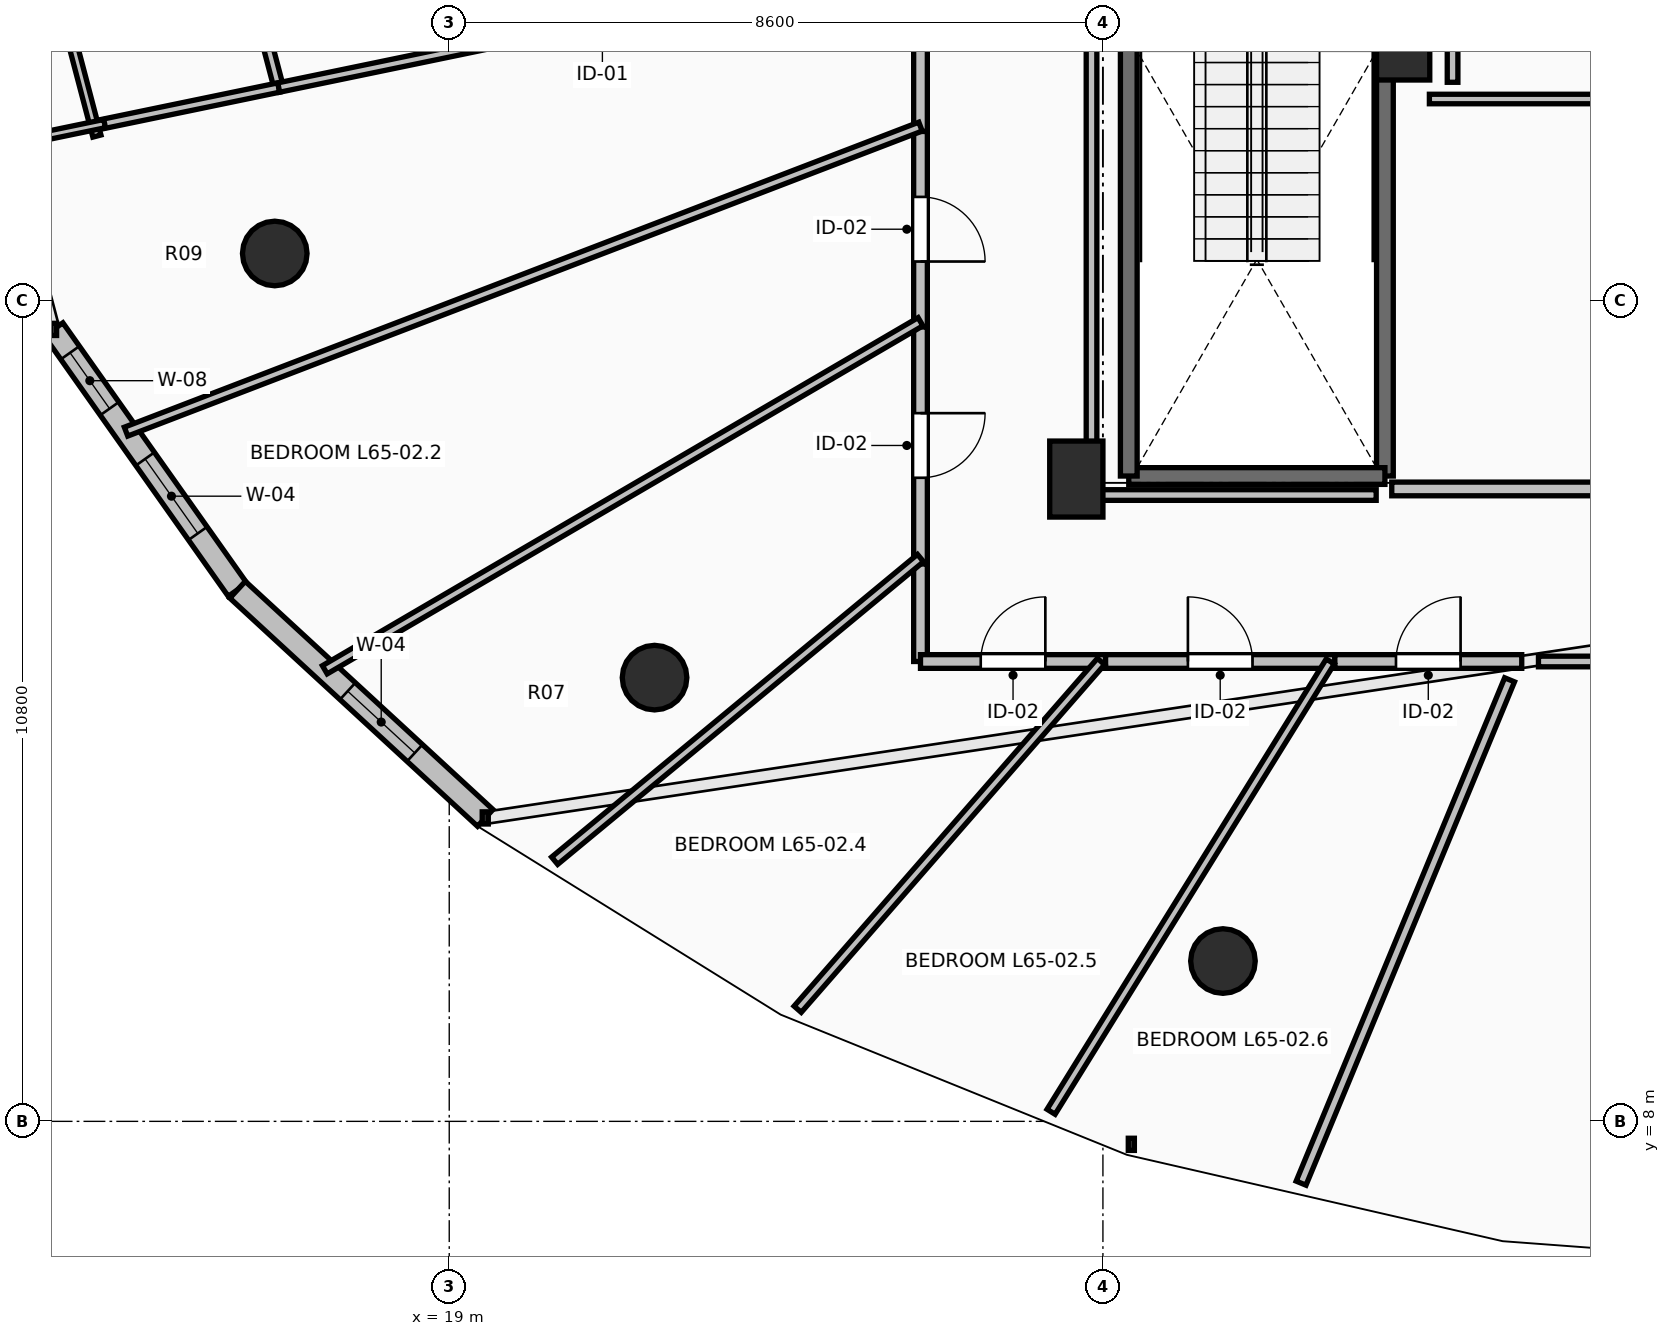
"""IFC4 building model, lengths in metres.
Left out: names, types, materials, properties, quantities, classifications, styles, units other than length and angle.
Written with IfcOpenShell. Run it as: python <this file> out.ifc"""

import sys

from ifc_helpers import new_model, si_unit, direction, frame, frame_2d, origin, origin_2d, place, context, subcontext, project, spatial, rectangle, circle, extrude, element, fill, save


model = new_model("IFC4")
c1 = context("Model", 3, precision=1e-05, world=origin(), true_north=direction((0.0, 1.0)))
c2 = subcontext(c1, "Body", "Model", "MODEL_VIEW")
j1 = project(units=[si_unit("LENGTHUNIT", "METRE"), si_unit("PLANEANGLEUNIT", "RADIAN")], contexts=[c1])
p1 = place(None, origin())
s1 = spatial("IfcSite", under=j1, at=p1, CompositionType="ELEMENT")
p2 = place(p1, origin())
s2 = spatial("IfcBuilding", under=s1, at=p2, CompositionType="ELEMENT")
p3 = place(p2, frame((0.0, 0.0, 241.35)))
s3 = spatial("IfcBuildingStorey", under=s2, at=p3, CompositionType="ELEMENT", Elevation=241.35)
for number, where, z_axis, x_axis in (
    (1, (16.705, 19.418, 0.0), (0.0, 0.0, 1.0), (-0.924, -0.383, 0.0)),
    (2, (21.701, 13.838, 0.0), (0.0, 0.0, 1.0), (-0.707, -0.707, 0.0)),
    (3, (29.179, 10.109, 0.0), (0.0, 0.0, 1.0), (-0.383, -0.924, 0.0)),
):
    element("IfcColumn", number, at=place(p3, frame(where, z_axis=z_axis, x_axis=x_axis)), inside=s3, PredefinedType="COLUMN", context=c2, shape_type="SweptSolid", body=[
        extrude(circle(Radius=0.425, at=origin_2d()), origin(), (0.0, 0.0, 1.0), 3.55),
    ])
for number, where, z_axis, x_axis in (
    (4, (27.25, 16.45, 0.0), (0.0, 0.0, 1.0), (1.0, 0.0, 0.0)),
    (5, (31.55, 22.2, 0.0), (0.0, 0.0, 1.0), (1.0, 0.0, 0.0)),
):
    element("IfcColumn", number, at=place(p3, frame(where, z_axis=z_axis, x_axis=x_axis)), inside=s3, PredefinedType="PILASTER", context=c2, shape_type="SweptSolid", body=[
        extrude(rectangle(XDim=0.7, YDim=1.0, at=origin_2d()), origin(), (0.0, 0.0, 1.0), 3.55),
    ])
p4 = place(p3, frame((13.794, 18.419, 0.0), z_axis=(0.0, 0.0, 1.0), x_axis=(0.577261247247, -0.816559521668, 0.0)))
e6 = element("IfcWall", 6, at=p4, inside=s3, PredefinedType="STANDARD", context=c2, shape_type="SweptSolid", body=[
    extrude(rectangle(XDim=4.194, YDim=0.3, at=frame_2d((2.097, 0.0))), origin(), (0.0, 0.0, 1.0), 3.29),
])
p5 = place(p4, frame((0.376, 0.0, 0.85)))
e7 = element("IfcOpeningElement", 7, at=p5, cuts=e6, PredefinedType="OPENING", context=c2, shape_type="SweptSolid", body=[
    extrude(rectangle(XDim=0.9, YDim=1.8, at=frame_2d((0.45, 0.9))), frame((0.0, 0.165, 0.0), z_axis=(0.0, -1.0, 0.0), x_axis=(1.0, 0.0, 0.0)), (0.0, 0.0, 1.0), 0.33),
])
p6 = place(p4, frame((2.087, 0.0, 0.85)))
e8 = element("IfcOpeningElement", 8, at=p6, cuts=e6, PredefinedType="OPENING", context=c2, shape_type="SweptSolid", body=[
    extrude(rectangle(XDim=1.2, YDim=1.95, at=frame_2d((0.6, 0.975))), frame((0.0, 0.165, 0.0), z_axis=(0.0, -1.0, 0.0), x_axis=(1.0, 0.0, 0.0)), (0.0, 0.0, 1.0), 0.33),
])
p7 = place(p3, frame((16.216, 14.994, 0.0), z_axis=(0.0, 0.0, 1.0), x_axis=(0.735445373611, -0.677584018727, 0.0)))
e9 = element("IfcWall", 9, at=p7, inside=s3, PredefinedType="STANDARD", context=c2, shape_type="SweptSolid", body=[
    extrude(rectangle(XDim=4.43, YDim=0.3, at=frame_2d((2.215, 0.0))), origin(), (0.0, 0.0, 1.0), 3.29),
])
p8 = place(p7, frame((1.969, 0.0, 0.85)))
e10 = element("IfcOpeningElement", 10, at=p8, cuts=e9, PredefinedType="OPENING", context=c2, shape_type="SweptSolid", body=[
    extrude(rectangle(XDim=1.2, YDim=1.95, at=frame_2d((0.6, 0.975))), frame((0.0, 0.165, 0.0), z_axis=(0.0, -1.0, 0.0), x_axis=(1.0, 0.0, 0.0)), (0.0, 0.0, 1.0), 0.33),
])
p9 = place(p3, frame((31.31, 23.91, 0.0), z_axis=(0.0, 0.0, 1.0), x_axis=(0.0, -1.0, 0.0)))
e11 = element("IfcWall", 11, at=p9, inside=s3, PredefinedType="SOLIDWALL", context=c2, shape_type="SweptSolid", body=[
    extrude(rectangle(XDim=7.42, YDim=0.22, at=frame_2d((3.71, 0.0))), origin(), (0.0, 0.0, 1.0), 3.29),
])
p10 = place(p3, frame((31.31, 16.49, 0.0), z_axis=(0.0, 0.0, 1.0), x_axis=(-1.0, 0.0, 0.0)))
e12 = element("IfcWall", 12, at=p10, inside=s3, PredefinedType="SOLIDWALL", context=c2, shape_type="SweptSolid", body=[
    extrude(rectangle(XDim=3.37, YDim=0.22, at=frame_2d((1.685, 0.0))), origin(), (0.0, 0.0, 1.0), 3.29),
])
p11 = place(p3, frame((27.94, 16.49, 0.0), z_axis=(0.0, 0.0, 1.0), x_axis=(0.0, 1.0, 0.0)))
e13 = element("IfcWall", 13, at=p11, inside=s3, PredefinedType="SOLIDWALL", context=c2, shape_type="SweptSolid", body=[
    extrude(rectangle(XDim=7.42, YDim=0.22, at=frame_2d((3.71, 0.0))), origin(), (0.0, 0.0, 1.0), 3.29),
])
p12 = place(p3, frame((35.005, 21.45, 0.0), z_axis=(0.0, 0.0, 1.0), x_axis=(-1.0, 0.0, 0.0)))
e14 = element("IfcWall", 14, at=p12, inside=s3, PredefinedType="PARTITIONING", context=c2, shape_type="SweptSolid", body=[
    extrude(rectangle(XDim=3.11, YDim=0.125, at=frame_2d((1.555, 0.0))), origin(), (0.0, 0.0, 1.0), 3.29),
])
p13 = place(p3, frame((31.4, 16.32, 0.0), z_axis=(0.0, 0.0, 1.0), x_axis=(1.0, 0.0, 0.0)))
e15 = element("IfcWall", 15, at=p13, inside=s3, PredefinedType="PARTITIONING", context=c2, shape_type="SweptSolid", body=[
    extrude(rectangle(XDim=7.4, YDim=0.18, at=frame_2d((3.7, 0.0))), origin(), (0.0, 0.0, 1.0), 3.29),
])
p14 = place(p13, frame((3.275, 0.0, 0.0)))
e16 = element("IfcOpeningElement", 16, at=p14, cuts=e15, PredefinedType="OPENING", context=c2, shape_type="SweptSolid", body=[
    extrude(rectangle(XDim=0.85, YDim=2.1, at=frame_2d((0.425, 1.05))), frame((0.0, 0.105, 0.0), z_axis=(0.0, -1.0, 0.0), x_axis=(1.0, 0.0, 0.0)), (0.0, 0.0, 1.0), 0.21),
])
p15 = place(p3, frame((25.2, 23.288, 0.0), z_axis=(0.0, 0.0, 1.0), x_axis=(0.0, -1.0, 0.0)))
e17 = element("IfcWall", 17, at=p15, inside=s3, PredefinedType="PARTITIONING", context=c2, shape_type="SweptSolid", body=[
    extrude(rectangle(XDim=2.265, YDim=0.18, at=frame_2d((1.133, 0.0))), origin(), (0.0, 0.0, 1.0), 3.29),
])
p16 = place(p3, frame((25.2, 21.023, 0.0), z_axis=(0.0, 0.0, 1.0), x_axis=(0.0, -1.0, 0.0)))
e18 = element("IfcWall", 18, at=p16, inside=s3, PredefinedType="PARTITIONING", context=c2, shape_type="SweptSolid", body=[
    extrude(rectangle(XDim=2.572, YDim=0.18, at=frame_2d((1.286, 0.0))), origin(), (0.0, 0.0, 1.0), 3.29),
])
p17 = place(p16, frame((0.861, 0.0, 0.0)))
e19 = element("IfcOpeningElement", 19, at=p17, cuts=e18, PredefinedType="OPENING", context=c2, shape_type="SweptSolid", body=[
    extrude(rectangle(XDim=0.85, YDim=2.1, at=frame_2d((0.425, 1.05))), frame((0.0, 0.105, 0.0), z_axis=(0.0, -1.0, 0.0), x_axis=(1.0, 0.0, 0.0)), (0.0, 0.0, 1.0), 0.21),
])
p18 = place(p3, frame((25.2, 18.451, 0.0), z_axis=(0.0, 0.0, 1.0), x_axis=(0.0, -1.0, 0.0)))
e20 = element("IfcWall", 20, at=p18, inside=s3, PredefinedType="PARTITIONING", context=c2, shape_type="SweptSolid", body=[
    extrude(rectangle(XDim=3.118, YDim=0.18, at=frame_2d((1.559, 0.0))), origin(), (0.0, 0.0, 1.0), 2.482),
])
p19 = place(p18, frame((1.134, 0.0, 0.0)))
e21 = element("IfcOpeningElement", 21, at=p19, cuts=e20, PredefinedType="OPENING", context=c2, shape_type="SweptSolid", body=[
    extrude(rectangle(XDim=0.85, YDim=2.1, at=frame_2d((0.425, 1.05))), frame((0.0, 0.105, 0.0), z_axis=(0.0, -1.0, 0.0), x_axis=(1.0, 0.0, 0.0)), (0.0, 0.0, 1.0), 0.21),
])
p20 = place(p3, frame((25.2, 15.333, 0.0), z_axis=(0.0, 0.0, 1.0), x_axis=(0.0, -1.0, 0.0)))
e22 = element("IfcWall", 22, at=p20, inside=s3, PredefinedType="PARTITIONING", context=c2, shape_type="SweptSolid", body=[
    extrude(rectangle(XDim=1.283, YDim=0.18, at=frame_2d((0.642, 0.0))), origin(), (0.0, 0.0, 1.0), 2.482),
])
p21 = place(p3, frame((25.2, 14.05, 0.0), z_axis=(0.0, 0.0, 1.0), x_axis=(1.0, 0.0, 0.0)))
e23 = element("IfcWall", 23, at=p21, inside=s3, PredefinedType="PARTITIONING", context=c2, shape_type="SweptSolid", body=[
    extrude(rectangle(XDim=2.435, YDim=0.18, at=frame_2d((1.218, 0.0))), origin(), (0.0, 0.0, 1.0), 2.924),
])
p22 = place(p21, frame((0.792, 0.0, 0.0)))
e24 = element("IfcOpeningElement", 24, at=p22, cuts=e23, PredefinedType="OPENING", context=c2, shape_type="SweptSolid", body=[
    extrude(rectangle(XDim=0.85, YDim=2.1, at=frame_2d((0.425, 1.05))), frame((0.0, 0.105, 0.0), z_axis=(0.0, -1.0, 0.0), x_axis=(1.0, 0.0, 0.0)), (0.0, 0.0, 1.0), 0.21),
])
p23 = place(p3, frame((27.635, 14.05, 0.0), z_axis=(0.0, 0.0, 1.0), x_axis=(1.0, 0.0, 0.0)))
e25 = element("IfcWall", 25, at=p23, inside=s3, PredefinedType="PARTITIONING", context=c2, shape_type="SweptSolid", body=[
    extrude(rectangle(XDim=3.016, YDim=0.18, at=frame_2d((1.508, 0.0))), origin(), (0.0, 0.0, 1.0), 2.482),
])
p24 = place(p23, frame((1.083, 0.0, 0.0)))
e26 = element("IfcOpeningElement", 26, at=p24, cuts=e25, PredefinedType="OPENING", context=c2, shape_type="SweptSolid", body=[
    extrude(rectangle(XDim=0.85, YDim=2.1, at=frame_2d((0.425, 1.05))), frame((0.0, 0.105, 0.0), z_axis=(0.0, -1.0, 0.0), x_axis=(1.0, 0.0, 0.0)), (0.0, 0.0, 1.0), 0.21),
])
p25 = place(p3, frame((30.651, 14.05, 0.0), z_axis=(0.0, 0.0, 1.0), x_axis=(1.0, 0.0, 0.0)))
e27 = element("IfcWall", 27, at=p25, inside=s3, PredefinedType="PARTITIONING", context=c2, shape_type="SweptSolid", body=[
    extrude(rectangle(XDim=2.459, YDim=0.18, at=frame_2d((1.229, 0.0))), origin(), (0.0, 0.0, 1.0), 2.972),
])
p26 = place(p25, frame((0.804, 0.0, 0.0)))
e28 = element("IfcOpeningElement", 28, at=p26, cuts=e27, PredefinedType="OPENING", context=c2, shape_type="SweptSolid", body=[
    extrude(rectangle(XDim=0.85, YDim=2.1, at=frame_2d((0.425, 1.05))), frame((0.0, 0.105, 0.0), z_axis=(0.0, -1.0, 0.0), x_axis=(1.0, 0.0, 0.0)), (0.0, 0.0, 1.0), 0.21),
])
p27 = place(p3, frame((15.6, 26.0, 0.0), z_axis=(0.0, 0.0, 1.0), x_axis=(0.25436383836, -0.967108596661, 0.0)))
e29 = element("IfcWall", 29, at=p27, inside=s3, PredefinedType="PARTITIONING", context=c2, shape_type="SweptSolid", body=[
    extrude(rectangle(XDim=4.549, YDim=0.125, at=frame_2d((2.274, 0.0))), origin(), (0.0, 0.0, 1.0), 2.482),
])
p28 = place(p27, frame((1.824, 0.0, 0.0)))
e30 = element("IfcOpeningElement", 30, at=p28, cuts=e29, PredefinedType="OPENING", context=c2, shape_type="SweptSolid", body=[
    extrude(rectangle(XDim=0.9, YDim=2.1, at=frame_2d((0.45, 1.05))), frame((0.0, 0.077, 0.0), z_axis=(0.0, -1.0, 0.0), x_axis=(1.0, 0.0, 0.0)), (0.0, 0.0, 1.0), 0.155),
])
p29 = place(p3, frame((16.757, 21.601, 0.0), z_axis=(0.0, 0.0, 1.0), x_axis=(-0.979193678003, -0.2029279206, 0.0)))
e31 = element("IfcWall", 31, at=p29, inside=s3, PredefinedType="PARTITIONING", context=c2, shape_type="SweptSolid", body=[
    extrude(rectangle(XDim=2.479, YDim=0.125, at=frame_2d((1.24, 0.0))), origin(), (0.0, 0.0, 1.0), 2.874),
])
p30 = place(p3, frame((16.757, 21.601, 0.0), z_axis=(0.0, 0.0, 1.0), x_axis=(0.979226116247, 0.20277133244, 0.0)))
e32 = element("IfcWall", 32, at=p30, inside=s3, PredefinedType="PARTITIONING", context=c2, shape_type="SweptSolid", body=[
    extrude(rectangle(XDim=8.622, YDim=0.125, at=frame_2d((4.311, 0.0))), origin(), (0.0, 0.0, 1.0), 2.924),
])
p31 = place(p30, frame((3.861, 0.0, 0.0)))
e33 = element("IfcOpeningElement", 33, at=p31, cuts=e32, PredefinedType="OPENING", context=c2, shape_type="SweptSolid", body=[
    extrude(rectangle(XDim=0.9, YDim=2.1, at=frame_2d((0.45, 1.05))), frame((0.0, 0.077, 0.0), z_axis=(0.0, -1.0, 0.0), x_axis=(1.0, 0.0, 0.0)), (0.0, 0.0, 1.0), 0.155),
])
p32 = place(p3, frame((14.365, 20.963, 0.0), z_axis=(0.0, 0.0, 1.0), x_axis=(-0.254288836667, 0.967128320104, 0.0)))
e34 = element("IfcWall", 34, at=p32, inside=s3, PredefinedType="PARTITIONING", context=c2, shape_type="SweptSolid", body=[
    extrude(rectangle(XDim=5.349, YDim=0.11, at=frame_2d((2.674, 0.0))), origin(), (0.0, 0.0, 1.0), 3.29),
])
p33 = place(p3, frame((12.708, 20.763, 0.0), z_axis=(0.0, 0.0, 1.0), x_axis=(0.979256697864, 0.202623591143, 0.0)))
e35 = element("IfcWall", 35, at=p33, inside=s3, PredefinedType="PARTITIONING", context=c2, shape_type="SweptSolid", body=[
    extrude(rectangle(XDim=1.795, YDim=0.11, at=frame_2d((0.898, 0.0))), origin(), (0.0, 0.0, 1.0), 3.29),
])
p34 = place(p3, frame((14.748, 17.074, 0.0), z_axis=(0.0, 0.0, 1.0), x_axis=(0.93355564233, 0.358432507836, 0.0)))
e36 = element("IfcWall", 36, at=p34, inside=s3, PredefinedType="PARTITIONING", context=c2, shape_type="SweptSolid", body=[
    extrude(rectangle(XDim=11.196, YDim=0.125, at=frame_2d((5.598, 0.0))), origin(), (0.0, 0.0, 1.0), 2.482),
])
p35 = place(p3, frame((17.363, 13.941, 0.0), z_axis=(0.0, 0.0, 1.0), x_axis=(0.863415767124, 0.5044930258, 0.0)))
e37 = element("IfcWall", 37, at=p35, inside=s3, PredefinedType="PARTITIONING", context=c2, shape_type="SweptSolid", body=[
    extrude(rectangle(XDim=9.077, YDim=0.125, at=frame_2d((4.538, 0.0))), origin(), (0.0, 0.0, 1.0), 2.482),
])
p36 = place(p3, frame((20.387, 11.429, 0.0), z_axis=(0.0, 0.0, 1.0), x_axis=(0.770490958976, 0.637450925277, 0.0)))
e38 = element("IfcWall", 38, at=p36, inside=s3, PredefinedType="PARTITIONING", context=c2, shape_type="SweptSolid", body=[
    extrude(rectangle(XDim=6.247, YDim=0.125, at=frame_2d((3.123, 0.0))), origin(), (0.0, 0.0, 1.0), 2.482),
])
p37 = place(p3, frame((23.584, 9.475, 0.0), z_axis=(0.0, 0.0, 1.0), x_axis=(0.657373610703, 0.75356481868, 0.0)))
e39 = element("IfcWall", 39, at=p37, inside=s3, PredefinedType="PARTITIONING", context=c2, shape_type="SweptSolid", body=[
    extrude(rectangle(XDim=6.071, YDim=0.125, at=frame_2d((3.036, 0.0))), origin(), (0.0, 0.0, 1.0), 2.874),
])
p38 = place(p3, frame((26.918, 8.126, 0.0), z_axis=(0.0, 0.0, 1.0), x_axis=(0.526957378796, 0.849891711298, 0.0)))
e40 = element("IfcWall", 40, at=p38, inside=s3, PredefinedType="PARTITIONING", context=c2, shape_type="SweptSolid", body=[
    extrude(rectangle(XDim=6.97, YDim=0.125, at=frame_2d((3.485, 0.0))), origin(), (0.0, 0.0, 1.0), 2.482),
])
p39 = place(p3, frame((32.2, 24.13, 0.0), z_axis=(0.0, 0.0, 1.0), x_axis=(0.0, -1.0, 0.0)))
e41 = element("IfcWall", 41, at=p39, inside=s3, PredefinedType="PARTITIONING", context=c2, shape_type="SweptSolid", body=[
    extrude(rectangle(XDim=2.46, YDim=0.14, at=frame_2d((1.23, 0.0))), origin(), (0.0, 0.0, 1.0), 2.482),
])
p40 = place(p3, frame((33.33, 14.05, 0.0), z_axis=(0.0, 0.0, 1.0), x_axis=(1.0, 0.0, 0.0)))
e42 = element("IfcWall", 42, at=p40, inside=s3, PredefinedType="PARTITIONING", context=c2, shape_type="SweptSolid", body=[
    extrude(rectangle(XDim=3.22, YDim=0.14, at=frame_2d((1.61, 0.0))), origin(), (0.0, 0.0, 1.0), 2.972),
])
p41 = place(p3, frame((27.45, 23.754, 0.0), z_axis=(0.0, 0.0, 1.0), x_axis=(0.0, -1.0, 0.0)))
e43 = element("IfcWall", 43, at=p41, inside=s3, PredefinedType="PARTITIONING", context=c2, shape_type="SweptSolid", body=[
    extrude(rectangle(XDim=7.514, YDim=0.14, at=frame_2d((3.757, 0.0))), origin(), (0.0, 0.0, 1.0), 2.482),
])
p42 = place(p3, frame((27.45, 16.24, 0.0), z_axis=(0.0, 0.0, 1.0), x_axis=(1.0, 0.0, 0.0)))
e44 = element("IfcWall", 44, at=p42, inside=s3, PredefinedType="PARTITIONING", context=c2, shape_type="SweptSolid", body=[
    extrude(rectangle(XDim=3.745, YDim=0.14, at=frame_2d((1.873, 0.0))), origin(), (0.0, 0.0, 1.0), 2.482),
])
p43 = place(p3, frame((30.207, 7.187, 0.0), z_axis=(0.0, 0.0, 1.0), x_axis=(0.382679691634, 0.923881081964, 0.0)))
e45 = element("IfcWall", 45, at=p43, inside=s3, PredefinedType="PARTITIONING", context=c2, shape_type="SweptSolid", body=[
    extrude(rectangle(XDim=7.168, YDim=0.14, at=frame_2d((3.584, 0.0))), origin(), (0.0, 0.0, 1.0), 2.874),
])
p44 = place(p5, origin())
e46 = element("IfcWindow", 46, at=p44, inside=s3, PartitioningType="SINGLE_PANEL", PredefinedType="WINDOW", context=c2, shape_type="SweptSolid", body=[
    extrude(rectangle(XDim=0.9, YDim=1.8, at=frame_2d((0.45, 0.9))), frame((0.0, 0.03, 0.0), z_axis=(0.0, -1.0, 0.0), x_axis=(1.0, 0.0, 0.0)), (0.0, 0.0, 1.0), 0.06),
])
fill(e7, e46)
p45 = place(p6, origin())
e47 = element("IfcWindow", 47, at=p45, inside=s3, PartitioningType="SINGLE_PANEL", PredefinedType="WINDOW", context=c2, shape_type="SweptSolid", body=[
    extrude(rectangle(XDim=1.2, YDim=1.95, at=frame_2d((0.6, 0.975))), frame((0.0, 0.03, 0.0), z_axis=(0.0, -1.0, 0.0), x_axis=(1.0, 0.0, 0.0)), (0.0, 0.0, 1.0), 0.06),
])
fill(e8, e47)
p46 = place(p8, origin())
e48 = element("IfcWindow", 48, at=p46, inside=s3, PartitioningType="SINGLE_PANEL", PredefinedType="WINDOW", context=c2, shape_type="SweptSolid", body=[
    extrude(rectangle(XDim=1.2, YDim=1.95, at=frame_2d((0.6, 0.975))), frame((0.0, 0.03, 0.0), z_axis=(0.0, -1.0, 0.0), x_axis=(1.0, 0.0, 0.0)), (0.0, 0.0, 1.0), 0.06),
])
fill(e10, e48)
p47 = place(p17, origin())
e49 = element("IfcDoor", 49, at=p47, inside=s3, OperationType="SINGLE_SWING_RIGHT", PredefinedType="DOOR", context=c2, shape_type="SweptSolid", body=[
    extrude(rectangle(XDim=0.85, YDim=2.1, at=frame_2d((0.425, 1.05))), frame((0.0, 0.025, 0.0), z_axis=(0.0, -1.0, 0.0), x_axis=(1.0, 0.0, 0.0)), (0.0, 0.0, 1.0), 0.05),
])
fill(e19, e49)
p48 = place(p19, origin())
e50 = element("IfcDoor", 50, at=p48, inside=s3, OperationType="SINGLE_SWING_LEFT", PredefinedType="DOOR", context=c2, shape_type="SweptSolid", body=[
    extrude(rectangle(XDim=0.85, YDim=2.1, at=frame_2d((0.425, 1.05))), frame((0.0, 0.025, 0.0), z_axis=(0.0, -1.0, 0.0), x_axis=(1.0, 0.0, 0.0)), (0.0, 0.0, 1.0), 0.05),
])
fill(e21, e50)
p49 = place(p22, origin())
e51 = element("IfcDoor", 51, at=p49, inside=s3, OperationType="SINGLE_SWING_RIGHT", PredefinedType="DOOR", context=c2, shape_type="SweptSolid", body=[
    extrude(rectangle(XDim=0.85, YDim=2.1, at=frame_2d((0.425, 1.05))), frame((0.0, 0.025, 0.0), z_axis=(0.0, -1.0, 0.0), x_axis=(1.0, 0.0, 0.0)), (0.0, 0.0, 1.0), 0.05),
])
fill(e24, e51)
p50 = place(p24, origin())
e52 = element("IfcDoor", 52, at=p50, inside=s3, OperationType="SINGLE_SWING_LEFT", PredefinedType="DOOR", context=c2, shape_type="SweptSolid", body=[
    extrude(rectangle(XDim=0.85, YDim=2.1, at=frame_2d((0.425, 1.05))), frame((0.0, 0.025, 0.0), z_axis=(0.0, -1.0, 0.0), x_axis=(1.0, 0.0, 0.0)), (0.0, 0.0, 1.0), 0.05),
])
fill(e26, e52)
p51 = place(p26, origin())
e53 = element("IfcDoor", 53, at=p51, inside=s3, OperationType="SINGLE_SWING_RIGHT", PredefinedType="DOOR", context=c2, shape_type="SweptSolid", body=[
    extrude(rectangle(XDim=0.85, YDim=2.1, at=frame_2d((0.425, 1.05))), frame((0.0, 0.025, 0.0), z_axis=(0.0, -1.0, 0.0), x_axis=(1.0, 0.0, 0.0)), (0.0, 0.0, 1.0), 0.05),
])
fill(e28, e53)
save(model, sys.argv[1])
